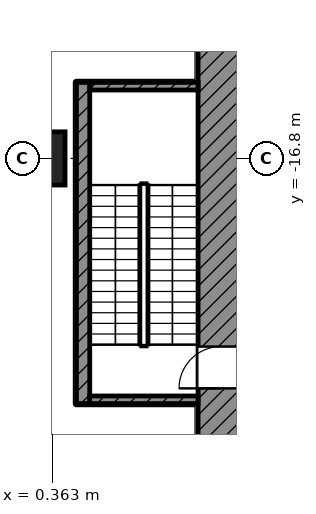
"""IFC4 building model, lengths in metres.
Left out: names, types, materials, properties, quantities, classifications, styles, units other than length and angle.
Written with IfcOpenShell. Run it as: python <this file> out.ifc"""

import sys

from ifc_helpers import new_model, si_unit, direction, frame, frame_2d, origin, origin_2d, place, context, subcontext, project, spatial, rectangle, extrude, element, fill, save


model = new_model("IFC4")
c1 = context("Model", 3, precision=1e-05, world=origin(), true_north=direction((0.0, 1.0)))
c2 = subcontext(c1, "Body", "Model", "MODEL_VIEW")
j1 = project(units=[si_unit("LENGTHUNIT", "METRE"), si_unit("PLANEANGLEUNIT", "RADIAN")], contexts=[c1])
p1 = place(None, origin())
s1 = spatial("IfcSite", under=j1, at=p1, CompositionType="ELEMENT")
p2 = place(p1, origin())
s2 = spatial("IfcBuilding", under=s1, at=p2, CompositionType="ELEMENT")
p3 = place(p2, frame((0.0, 0.0, 12.6)))
s3 = spatial("IfcBuildingStorey", under=s2, at=p3, CompositionType="ELEMENT", Elevation=12.6)
p4 = place(p3, frame((0.0, -16.8, 0.0), z_axis=(0.0, 0.0, 1.0), x_axis=(1.0, 0.0, 0.0)))
e1 = element("IfcColumn", 1, at=p4, inside=s3, PredefinedType="COLUMN", context=c2, shape_type="SweptSolid", body=[
    extrude(rectangle(XDim=1.4, YDim=1.4, at=origin_2d()), origin(), (0.0, 0.0, 1.0), 5.6),
])
p5 = place(p3, frame((4.8, -25.2, 0.0), z_axis=(0.0, 0.0, 1.0), x_axis=(0.0, 1.0, 0.0)))
e2 = element("IfcWall", 2, at=p5, inside=s3, PredefinedType="SHEAR", context=c2, shape_type="SweptSolid", body=[
    extrude(rectangle(XDim=19.8, YDim=1.2, at=frame_2d((9.9, 0.0))), origin(), (0.0, 0.0, 1.0), 5.25),
])
p6 = place(p5, frame((11.65, 0.0, 0.0)))
e3 = element("IfcOpeningElement", 3, at=p6, cuts=e2, PredefinedType="OPENING", context=c2, shape_type="SweptSolid", body=[
    extrude(rectangle(XDim=1.1, YDim=2.1, at=frame_2d((0.55, 1.05))), frame((0.0, 0.61, 0.0), z_axis=(0.0, -1.0, 0.0), x_axis=(1.0, 0.0, 0.0)), (0.0, 0.0, 1.0), 1.22),
])
p7 = place(p5, frame((2.35, 0.0, 0.0)))
e4 = element("IfcOpeningElement", 4, at=p7, cuts=e2, PredefinedType="OPENING", context=c2, shape_type="SweptSolid", body=[
    extrude(rectangle(XDim=1.1, YDim=2.1, at=frame_2d((0.55, 1.05))), frame((0.0, 0.61, 0.0), z_axis=(0.0, -1.0, 0.0), x_axis=(1.0, 0.0, 0.0)), (0.0, 0.0, 1.0), 1.22),
])
p8 = place(p3, frame((1.175, -23.25, 0.0), z_axis=(0.0, 0.0, 1.0), x_axis=(0.0, 1.0, 0.0)))
e5 = element("IfcWall", 5, at=p8, inside=s3, PredefinedType="SHEAR", context=c2, shape_type="SweptSolid", body=[
    extrude(rectangle(XDim=8.45, YDim=0.35, at=frame_2d((4.225, 0.0))), origin(), (0.0, 0.0, 1.0), 5.25),
])
for number, where, z_axis, x_axis in (
    (6, (1.35, -14.9, 0.0), (0.0, 0.0, 1.0), (1.0, 0.0, 0.0)),
    (7, (1.35, -23.15, 0.0), (0.0, 0.0, 1.0), (1.0, 0.0, 0.0)),
):
    element("IfcWall", number, at=place(p3, frame(where, z_axis=z_axis, x_axis=x_axis)), inside=s3, PredefinedType="SHEAR", context=c2, shape_type="SweptSolid", body=[
        extrude(rectangle(XDim=2.85, YDim=0.2, at=frame_2d((1.425, 0.0))), origin(), (0.0, 0.0, 1.0), 5.25),
    ])
p9 = place(p7, origin())
e8 = element("IfcDoor", 8, at=p9, inside=s3, OperationType="SINGLE_SWING_LEFT", PredefinedType="DOOR", context=c2, shape_type="SweptSolid", body=[
    extrude(rectangle(XDim=1.1, YDim=2.1, at=frame_2d((0.55, 1.05))), frame((0.0, 0.025, 0.0), z_axis=(0.0, -1.0, 0.0), x_axis=(1.0, 0.0, 0.0)), (0.0, 0.0, 1.0), 0.05),
])
fill(e4, e8)
save(model, sys.argv[1])
